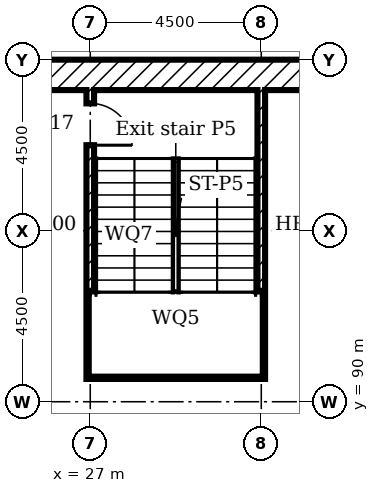
"""IFC4 building model, lengths in metres.
Left out: names, types, materials, properties, quantities, classifications, styles, units other than length and angle.
Written with IfcOpenShell. Run it as: python <this file> out.ifc"""

import sys

from ifc_helpers import new_model, si_unit, direction, frame, frame_2d, origin, place, context, subcontext, project, spatial, rectangle, extrude, element, fill, save


model = new_model("IFC4")
c1 = context("Model", 3, precision=1e-05, world=origin(), true_north=direction((0.0, 1.0)))
c2 = subcontext(c1, "Body", "Model", "MODEL_VIEW")
j1 = project(units=[si_unit("LENGTHUNIT", "METRE"), si_unit("PLANEANGLEUNIT", "RADIAN")], contexts=[c1])
p1 = place(None, origin())
s1 = spatial("IfcSite", under=j1, at=p1, CompositionType="ELEMENT")
p2 = place(p1, origin())
s2 = spatial("IfcBuilding", under=s1, at=p2, CompositionType="ELEMENT")
p3 = place(p2, frame((0.0, 0.0, -4.0)))
s3 = spatial("IfcBuildingStorey", under=s2, at=p3, CompositionType="ELEMENT", Elevation=-4.0)
p4 = place(p3, frame((0.0, 98.6, 0.0)))
e1 = element("IfcWall", 1, at=p4, inside=s3, PredefinedType="SOLIDWALL", context=c2, shape_type="SweptSolid", body=[
    extrude(rectangle(XDim=153.0, YDim=0.8, at=frame_2d((76.5, 0.0))), origin(), (0.0, 0.0, 1.0), 4.0),
])
p5 = place(p3, frame((27.0, 90.6, 0.0), z_axis=(0.0, 0.0, 1.0), x_axis=(0.0, 1.0, 0.0)))
e2 = element("IfcWall", 2, at=p5, inside=s3, PredefinedType="SOLIDWALL", context=c2, shape_type="SweptSolid", body=[
    extrude(rectangle(XDim=7.6, YDim=0.2, at=frame_2d((3.8, 0.0))), origin(), (0.0, 0.0, 1.0), 3.55),
])
p6 = place(p5, frame((6.15, 0.0, 0.0)))
e3 = element("IfcOpeningElement", 3, at=p6, cuts=e2, PredefinedType="OPENING", context=c2, shape_type="SweptSolid", body=[
    extrude(rectangle(XDim=1.1, YDim=2.1, at=frame_2d((0.55, 1.05))), frame((0.0, 0.11, 0.0), z_axis=(0.0, -1.0, 0.0), x_axis=(1.0, 0.0, 0.0)), (0.0, 0.0, 1.0), 0.22),
])
p7 = place(p3, frame((31.5, 90.6, 0.0), z_axis=(0.0, 0.0, 1.0), x_axis=(0.0, 1.0, 0.0)))
e4 = element("IfcWall", 4, at=p7, inside=s3, PredefinedType="SOLIDWALL", context=c2, shape_type="SweptSolid", body=[
    extrude(rectangle(XDim=7.6, YDim=0.2, at=frame_2d((3.8, 0.0))), origin(), (0.0, 0.0, 1.0), 3.55),
])
p8 = place(p3, frame((27.1, 90.7, 0.0)))
e5 = element("IfcWall", 5, at=p8, inside=s3, PredefinedType="SOLIDWALL", context=c2, shape_type="SweptSolid", body=[
    extrude(rectangle(XDim=4.3, YDim=0.2, at=frame_2d((2.15, 0.0))), origin(), (0.0, 0.0, 1.0), 3.55),
])
for number, where, z_axis, x_axis in (
    (6, (31.4, 92.78, -2.0), (0.0, 0.0, 1.0), (-1.0, 0.0, 0.0)),
    (7, (31.4, 91.4, -2.0), (0.0, 0.0, 1.0), (-1.0, 0.0, 0.0)),
):
    element("IfcWall", number, at=place(p3, frame(where, z_axis=z_axis, x_axis=x_axis)), inside=s3, PredefinedType="SOLIDWALL", context=c2, shape_type="SweptSolid", body=[
        extrude(rectangle(XDim=4.3, YDim=0.2, at=frame_2d((2.15, 0.0))), origin(), (0.0, 0.0, 1.0), 3.8),
    ])
p9 = place(p6, frame((1.1, 0.0, 0.0), x_axis=(-1.0, 0.0, 0.0)))
e8 = element("IfcDoor", 8, at=p9, inside=s3, OperationType="SINGLE_SWING_LEFT", PredefinedType="DOOR", context=c2, shape_type="SweptSolid", body=[
    extrude(rectangle(XDim=1.1, YDim=2.1, at=frame_2d((0.55, 1.05))), frame((0.0, 0.025, 0.0), z_axis=(0.0, -1.0, 0.0), x_axis=(1.0, 0.0, 0.0)), (0.0, 0.0, 1.0), 0.05),
])
fill(e3, e8)
save(model, sys.argv[1])
